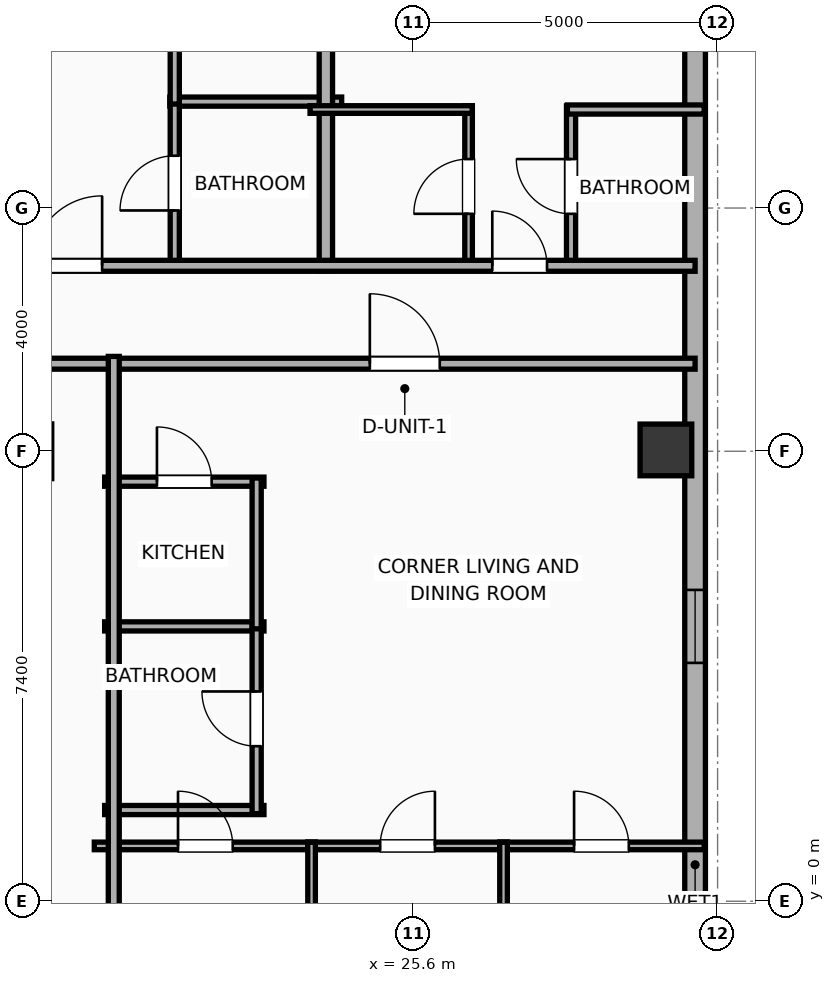
"""IFC4 building model, lengths in metres.
Left out: names, types, materials, properties, quantities, classifications, styles, units other than length and angle.
Written with IfcOpenShell. Run it as: python <this file> out.ifc"""

import sys

from ifc_helpers import new_model, si_unit, direction, frame, frame_2d, origin, origin_2d, place, context, subcontext, project, spatial, rectangle, hollow_rectangle, extrude, element, fill, save


model = new_model("IFC4")
c1 = context("Model", 3, precision=1e-05, world=origin(), true_north=direction((0.0, 1.0)))
c2 = subcontext(c1, "Body", "Model", "MODEL_VIEW")
j1 = project(units=[si_unit("LENGTHUNIT", "METRE"), si_unit("PLANEANGLEUNIT", "RADIAN")], contexts=[c1])
p1 = place(None, origin())
s1 = spatial("IfcSite", under=j1, at=p1, CompositionType="ELEMENT")
p2 = place(p1, origin())
s2 = spatial("IfcBuilding", under=s1, at=p2, CompositionType="ELEMENT")
p3 = place(p2, frame((0.0, 0.0, 250.9)))
s3 = spatial("IfcBuildingStorey", under=s2, at=p3, CompositionType="ELEMENT", Elevation=250.9)
p4 = place(p3, frame((29.75, 7.422, 0.0), z_axis=(0.0, 0.0, 1.0), x_axis=(1.0, 0.0, 0.0)))
e1 = element("IfcColumn", 1, at=p4, inside=s3, PredefinedType="COLUMN", context=c2, shape_type="SweptSolid", body=[
    extrude(hollow_rectangle(XDim=0.85, YDim=0.85, WallThickness=0.028, at=origin_2d()), origin(), (0.0, 0.0, 1.0), 3.865),
])
p5 = place(p3, frame((30.23, 16.583, 0.0), z_axis=(0.0, 0.0, 1.0), x_axis=(0.0, -1.0, 0.0)))
e2 = element("IfcWall", 2, at=p5, inside=s3, PredefinedType="ELEMENTEDWALL", context=c2, shape_type="SweptSolid", body=[
    extrude(rectangle(XDim=31.967, YDim=0.34, at=frame_2d((15.983, 0.0))), origin(), (0.0, 0.0, 1.0), 2.39),
])
p6 = place(p5, frame((30.106, 0.0, 0.55)))
e3 = element("IfcOpeningElement", 3, at=p6, cuts=e2, PredefinedType="OPENING", context=c2, shape_type="SweptSolid", body=[
    extrude(rectangle(XDim=1.2, YDim=1.15, at=frame_2d((0.6, 0.575))), frame((0.0, 0.18, 0.0), z_axis=(0.0, -1.0, 0.0), x_axis=(1.0, 0.0, 0.0)), (0.0, 0.0, 1.0), 0.36),
])
p7 = place(p5, frame((11.463, 0.0, 0.55)))
e4 = element("IfcOpeningElement", 4, at=p7, cuts=e2, PredefinedType="OPENING", context=c2, shape_type="SweptSolid", body=[
    extrude(rectangle(XDim=1.2, YDim=1.15, at=frame_2d((0.6, 0.575))), frame((0.0, 0.18, 0.0), z_axis=(0.0, -1.0, 0.0), x_axis=(1.0, 0.0, 0.0)), (0.0, 0.0, 1.0), 0.36),
])
p8 = place(p5, frame((20.363, 0.0, 0.55)))
e5 = element("IfcOpeningElement", 5, at=p8, cuts=e2, PredefinedType="OPENING", context=c2, shape_type="SweptSolid", body=[
    extrude(rectangle(XDim=1.2, YDim=1.15, at=frame_2d((0.6, 0.575))), frame((0.0, 0.18, 0.0), z_axis=(0.0, -1.0, 0.0), x_axis=(1.0, 0.0, 0.0)), (0.0, 0.0, 1.0), 0.36),
])
p9 = place(p3, frame((9.88, 8.84, 0.0), z_axis=(0.0, 0.0, 1.0), x_axis=(1.0, 0.0, 0.0)))
e6 = element("IfcWall", 6, at=p9, inside=s3, PredefinedType="PARTITIONING", context=c2, shape_type="SweptSolid", body=[
    extrude(rectangle(XDim=20.35, YDim=0.18, at=frame_2d((10.175, 0.0))), origin(), (0.0, 0.0, 1.0), 3.5),
])
p10 = place(p9, frame((15.001, 0.0, 0.0)))
e7 = element("IfcOpeningElement", 7, at=p10, cuts=e6, PredefinedType="OPENING", context=c2, shape_type="SweptSolid", body=[
    extrude(rectangle(XDim=1.15, YDim=2.05, at=frame_2d((0.575, 1.025))), frame((0.0, 0.1, 0.0), z_axis=(0.0, -1.0, 0.0), x_axis=(1.0, 0.0, 0.0)), (0.0, 0.0, 1.0), 0.2),
])
p11 = place(p3, frame((21.593, 13.15, 0.0), z_axis=(0.0, 0.0, 1.0), x_axis=(1.0, 0.0, 0.0)))
e8 = element("IfcWall", 8, at=p11, inside=s3, PredefinedType="PLUMBINGWALL", context=c2, shape_type="SweptSolid", body=[
    extrude(rectangle(XDim=2.825, YDim=0.15, at=frame_2d((1.413, 0.0))), origin(), (0.0, 0.0, 1.0), 3.5),
])
p12 = place(p3, frame((21.673, 10.43, 0.0), z_axis=(0.0, 0.0, 1.0), x_axis=(0.0, 1.0, 0.0)))
e9 = element("IfcWall", 9, at=p12, inside=s3, PredefinedType="PLUMBINGWALL", context=c2, shape_type="SweptSolid", body=[
    extrude(rectangle(XDim=2.76, YDim=0.15, at=frame_2d((1.38, 0.0))), origin(), (0.0, 0.0, 1.0), 2.39),
])
p13 = place(p12, frame((0.93, 0.0, 0.0)))
e10 = element("IfcOpeningElement", 10, at=p13, cuts=e9, PredefinedType="OPENING", context=c2, shape_type="SweptSolid", body=[
    extrude(rectangle(XDim=0.9, YDim=2.05, at=frame_2d((0.45, 1.025))), frame((0.0, 0.085, 0.0), z_axis=(0.0, -1.0, 0.0), x_axis=(1.0, 0.0, 0.0)), (0.0, 0.0, 1.0), 0.17),
])
p14 = place(p3, frame((21.673, 13.11, 0.0), z_axis=(0.0, 0.0, 1.0), x_axis=(0.0, 1.0, 0.0)))
e11 = element("IfcWall", 11, at=p14, inside=s3, PredefinedType="PLUMBINGWALL", context=c2, shape_type="SweptSolid", body=[
    extrude(rectangle(XDim=6.967, YDim=0.15, at=frame_2d((3.483, 0.0))), origin(), (0.0, 0.0, 1.0), 2.39),
])
p15 = place(p14, frame((3.033, 0.0, 0.0)))
e12 = element("IfcOpeningElement", 12, at=p15, cuts=e11, PredefinedType="OPENING", context=c2, shape_type="SweptSolid", body=[
    extrude(rectangle(XDim=0.9, YDim=2.05, at=frame_2d((0.45, 1.025))), frame((0.0, 0.085, 0.0), z_axis=(0.0, -1.0, 0.0), x_axis=(1.0, 0.0, 0.0)), (0.0, 0.0, 1.0), 0.17),
])
p16 = place(p3, frame((24.158, 10.37, 0.0), z_axis=(0.0, 0.0, 1.0), x_axis=(0.0, 1.0, 0.0)))
e13 = element("IfcWall", 13, at=p16, inside=s3, PredefinedType="PARTITIONING", context=c2, shape_type="SweptSolid", body=[
    extrude(rectangle(XDim=9.66, YDim=0.22, at=frame_2d((4.83, 0.0))), origin(), (0.0, 0.0, 1.0), 2.39),
])
p17 = place(p3, frame((26.505, 10.43, 0.0), z_axis=(0.0, 0.0, 1.0), x_axis=(0.0, 1.0, 0.0)))
e14 = element("IfcWall", 14, at=p17, inside=s3, PredefinedType="PARTITIONING", context=c2, shape_type="SweptSolid", body=[
    extrude(rectangle(XDim=2.65, YDim=0.125, at=frame_2d((1.325, 0.0))), origin(), (0.0, 0.0, 1.0), 3.5),
])
p18 = place(p17, frame((0.875, 0.0, 0.0)))
e15 = element("IfcOpeningElement", 15, at=p18, cuts=e14, PredefinedType="OPENING", context=c2, shape_type="SweptSolid", body=[
    extrude(rectangle(XDim=0.9, YDim=2.05, at=frame_2d((0.45, 1.025))), frame((0.0, 0.073, 0.0), z_axis=(0.0, -1.0, 0.0), x_axis=(1.0, 0.0, 0.0)), (0.0, 0.0, 1.0), 0.145),
])
p19 = place(p3, frame((28.19, 10.43, 0.0), z_axis=(0.0, 0.0, 1.0), x_axis=(0.0, 1.0, 0.0)))
e16 = element("IfcWall", 16, at=p19, inside=s3, PredefinedType="PLUMBINGWALL", context=c2, shape_type="SweptSolid", body=[
    extrude(rectangle(XDim=2.65, YDim=0.15, at=frame_2d((1.325, 0.0))), origin(), (0.0, 0.0, 1.0), 3.5),
])
p20 = place(p19, frame((0.875, 0.0, 0.0)))
e17 = element("IfcOpeningElement", 17, at=p20, cuts=e16, PredefinedType="OPENING", context=c2, shape_type="SweptSolid", body=[
    extrude(rectangle(XDim=0.9, YDim=2.05, at=frame_2d((0.45, 1.025))), frame((0.0, 0.085, 0.0), z_axis=(0.0, -1.0, 0.0), x_axis=(1.0, 0.0, 0.0)), (0.0, 0.0, 1.0), 0.17),
])
p21 = place(p3, frame((23.898, 13.02, 0.0), z_axis=(0.0, 0.0, 1.0), x_axis=(1.0, 0.0, 0.0)))
e18 = element("IfcWall", 18, at=p21, inside=s3, PredefinedType="PARTITIONING", context=c2, shape_type="SweptSolid", body=[
    extrude(rectangle(XDim=2.667, YDim=0.125, at=frame_2d((1.333, 0.0))), origin(), (0.0, 0.0, 1.0), 3.5),
])
p22 = place(p3, frame((28.13, 13.02, 0.0), z_axis=(0.0, 0.0, 1.0), x_axis=(1.0, 0.0, 0.0)))
e19 = element("IfcWall", 19, at=p22, inside=s3, PredefinedType="PLUMBINGWALL", context=c2, shape_type="SweptSolid", body=[
    extrude(rectangle(XDim=2.25, YDim=0.15, at=frame_2d((1.125, 0.0))), origin(), (0.0, 0.0, 1.0), 3.5),
])
p23 = place(p3, frame((-26.23, 10.45, 0.0), z_axis=(0.0, 0.0, 1.0), x_axis=(1.0, 0.0, 0.0)))
e20 = element("IfcWall", 20, at=p23, inside=s3, PredefinedType="PARTITIONING", context=c2, shape_type="SweptSolid", body=[
    extrude(rectangle(XDim=56.46, YDim=0.18, at=frame_2d((28.23, 0.0))), origin(), (0.0, 0.0, 1.0), 3.5),
])
p24 = place(p23, frame((3.072, 0.0, 0.0)))
e21 = element("IfcOpeningElement", 21, at=p24, cuts=e20, PredefinedType="OPENING", context=c2, shape_type="SweptSolid", body=[
    extrude(rectangle(XDim=1.15, YDim=2.05, at=frame_2d((0.575, 1.025))), frame((0.0, 0.1, 0.0), z_axis=(0.0, -1.0, 0.0), x_axis=(1.0, 0.0, 0.0)), (0.0, 0.0, 1.0), 0.2),
])
p25 = place(p23, frame((12.146, 0.0, 0.0)))
e22 = element("IfcOpeningElement", 22, at=p25, cuts=e20, PredefinedType="OPENING", context=c2, shape_type="SweptSolid", body=[
    extrude(rectangle(XDim=1.15, YDim=2.05, at=frame_2d((0.575, 1.025))), frame((0.0, 0.1, 0.0), z_axis=(0.0, -1.0, 0.0), x_axis=(1.0, 0.0, 0.0)), (0.0, 0.0, 1.0), 0.2),
])
p26 = place(p23, frame((22.302, 0.0, 0.0)))
e23 = element("IfcOpeningElement", 23, at=p26, cuts=e20, PredefinedType="OPENING", context=c2, shape_type="SweptSolid", body=[
    extrude(rectangle(XDim=1.15, YDim=2.05, at=frame_2d((0.575, 1.025))), frame((0.0, 0.1, 0.0), z_axis=(0.0, -1.0, 0.0), x_axis=(1.0, 0.0, 0.0)), (0.0, 0.0, 1.0), 0.2),
])
p27 = place(p23, frame((32.601, 0.0, 0.0)))
e24 = element("IfcOpeningElement", 24, at=p27, cuts=e20, PredefinedType="OPENING", context=c2, shape_type="SweptSolid", body=[
    extrude(rectangle(XDim=1.15, YDim=2.05, at=frame_2d((0.575, 1.025))), frame((0.0, 0.1, 0.0), z_axis=(0.0, -1.0, 0.0), x_axis=(1.0, 0.0, 0.0)), (0.0, 0.0, 1.0), 0.2),
])
p28 = place(p23, frame((40.941, 0.0, 0.0)))
e25 = element("IfcOpeningElement", 25, at=p28, cuts=e20, PredefinedType="OPENING", context=c2, shape_type="SweptSolid", body=[
    extrude(rectangle(XDim=0.9, YDim=2.05, at=frame_2d((0.45, 1.025))), frame((0.0, 0.1, 0.0), z_axis=(0.0, -1.0, 0.0), x_axis=(1.0, 0.0, 0.0)), (0.0, 0.0, 1.0), 0.2),
])
p29 = place(p23, frame((45.559, 0.0, 0.0)))
e26 = element("IfcOpeningElement", 26, at=p29, cuts=e20, PredefinedType="OPENING", context=c2, shape_type="SweptSolid", body=[
    extrude(rectangle(XDim=1.15, YDim=2.05, at=frame_2d((0.575, 1.025))), frame((0.0, 0.1, 0.0), z_axis=(0.0, -1.0, 0.0), x_axis=(1.0, 0.0, 0.0)), (0.0, 0.0, 1.0), 0.2),
])
p30 = place(p23, frame((53.125, 0.0, 0.0)))
e27 = element("IfcOpeningElement", 27, at=p30, cuts=e20, PredefinedType="OPENING", context=c2, shape_type="SweptSolid", body=[
    extrude(rectangle(XDim=0.9, YDim=2.05, at=frame_2d((0.45, 1.025))), frame((0.0, 0.1, 0.0), z_axis=(0.0, -1.0, 0.0), x_axis=(1.0, 0.0, 0.0)), (0.0, 0.0, 1.0), 0.2),
])
p31 = place(p3, frame((20.52, 6.9, 0.0), z_axis=(0.0, 0.0, 1.0), x_axis=(1.0, 0.0, 0.0)))
e28 = element("IfcWall", 28, at=p31, inside=s3, PredefinedType="PLUMBINGWALL", context=c2, shape_type="SweptSolid", body=[
    extrude(rectangle(XDim=2.62, YDim=0.15, at=frame_2d((1.31, 0.0))), origin(), (0.0, 0.0, 1.0), 2.39),
])
p32 = place(p31, frame((0.86, 0.0, 0.0)))
e29 = element("IfcOpeningElement", 29, at=p32, cuts=e28, PredefinedType="OPENING", context=c2, shape_type="SweptSolid", body=[
    extrude(rectangle(XDim=0.9, YDim=2.05, at=frame_2d((0.45, 1.025))), frame((0.0, 0.085, 0.0), z_axis=(0.0, -1.0, 0.0), x_axis=(1.0, 0.0, 0.0)), (0.0, 0.0, 1.0), 0.17),
])
for number, where, z_axis, x_axis in (
    (30, (20.52, 4.52, 0.0), (0.0, 0.0, 1.0), (1.0, 0.0, 0.0)),
    (31, (20.52, 1.5, 0.0), (0.0, 0.0, 1.0), (1.0, 0.0, 0.0)),
):
    element("IfcWall", number, at=place(p3, frame(where, z_axis=z_axis, x_axis=x_axis)), inside=s3, PredefinedType="PLUMBINGWALL", context=c2, shape_type="SweptSolid", body=[
        extrude(rectangle(XDim=2.62, YDim=0.15, at=frame_2d((1.31, 0.0))), origin(), (0.0, 0.0, 1.0), 3.5),
    ])
p33 = place(p3, frame((23.02, 1.44, 0.0), z_axis=(0.0, 0.0, 1.0), x_axis=(0.0, 1.0, 0.0)))
e32 = element("IfcWall", 32, at=p33, inside=s3, PredefinedType="PLUMBINGWALL", context=c2, shape_type="SweptSolid", body=[
    extrude(rectangle(XDim=3.12, YDim=0.15, at=frame_2d((1.56, 0.0))), origin(), (0.0, 0.0, 1.0), 3.5),
])
p34 = place(p33, frame((1.11, 0.0, 0.0)))
e33 = element("IfcOpeningElement", 33, at=p34, cuts=e32, PredefinedType="OPENING", context=c2, shape_type="SweptSolid", body=[
    extrude(rectangle(XDim=0.9, YDim=2.05, at=frame_2d((0.45, 1.025))), frame((0.0, 0.085, 0.0), z_axis=(0.0, -1.0, 0.0), x_axis=(1.0, 0.0, 0.0)), (0.0, 0.0, 1.0), 0.17),
])
p35 = place(p3, frame((23.02, 4.48, 0.0), z_axis=(0.0, 0.0, 1.0), x_axis=(0.0, 1.0, 0.0)))
e34 = element("IfcWall", 34, at=p35, inside=s3, PredefinedType="PLUMBINGWALL", context=c2, shape_type="SweptSolid", body=[
    extrude(rectangle(XDim=2.48, YDim=0.15, at=frame_2d((1.24, 0.0))), origin(), (0.0, 0.0, 1.0), 3.5),
])
p36 = place(p3, frame((20.35, 0.91, 0.0), z_axis=(0.0, 0.0, 1.0), x_axis=(1.0, 0.0, 0.0)))
e35 = element("IfcWall", 35, at=p36, inside=s3, PredefinedType="PARTITIONING", context=c2, shape_type="SweptSolid", body=[
    extrude(rectangle(XDim=3.635, YDim=0.125, at=frame_2d((1.818, 0.0))), origin(), (0.0, 0.0, 1.0), 3.5),
])
p37 = place(p36, frame((1.376, 0.0, 0.0)))
e36 = element("IfcOpeningElement", 36, at=p37, cuts=e35, PredefinedType="OPENING", context=c2, shape_type="SweptSolid", body=[
    extrude(rectangle(XDim=0.9, YDim=2.05, at=frame_2d((0.45, 1.025))), frame((0.0, 0.073, 0.0), z_axis=(0.0, -1.0, 0.0), x_axis=(1.0, 0.0, 0.0)), (0.0, 0.0, 1.0), 0.145),
])
p38 = place(p3, frame((23.861, 0.91, 0.0), z_axis=(0.0, 0.0, 1.0), x_axis=(1.0, 0.0, 0.0)))
e37 = element("IfcWall", 37, at=p38, inside=s3, PredefinedType="PARTITIONING", context=c2, shape_type="SweptSolid", body=[
    extrude(rectangle(XDim=3.282, YDim=0.125, at=frame_2d((1.641, 0.0))), origin(), (0.0, 0.0, 1.0), 3.5),
])
p39 = place(p38, frame((1.191, 0.0, 0.0)))
e38 = element("IfcOpeningElement", 38, at=p39, cuts=e37, PredefinedType="OPENING", context=c2, shape_type="SweptSolid", body=[
    extrude(rectangle(XDim=0.9, YDim=2.05, at=frame_2d((0.45, 1.025))), frame((0.0, 0.073, 0.0), z_axis=(0.0, -1.0, 0.0), x_axis=(1.0, 0.0, 0.0)), (0.0, 0.0, 1.0), 0.145),
])
p40 = place(p3, frame((27.018, 0.91, 0.0), z_axis=(0.0, 0.0, 1.0), x_axis=(1.0, 0.0, 0.0)))
e39 = element("IfcWall", 39, at=p40, inside=s3, PredefinedType="PARTITIONING", context=c2, shape_type="SweptSolid", body=[
    extrude(rectangle(XDim=3.362, YDim=0.125, at=frame_2d((1.681, 0.0))), origin(), (0.0, 0.0, 1.0), 3.5),
])
p41 = place(p40, frame((1.222, 0.0, 0.0)))
e40 = element("IfcOpeningElement", 40, at=p41, cuts=e39, PredefinedType="OPENING", context=c2, shape_type="SweptSolid", body=[
    extrude(rectangle(XDim=0.9, YDim=2.05, at=frame_2d((0.45, 1.025))), frame((0.0, 0.073, 0.0), z_axis=(0.0, -1.0, 0.0), x_axis=(1.0, 0.0, 0.0)), (0.0, 0.0, 1.0), 0.145),
])
p42 = place(p3, frame((27.08, -9.16, 0.0), z_axis=(0.0, 0.0, 1.0), x_axis=(0.0, 1.0, 0.0)))
e41 = element("IfcWall", 41, at=p42, inside=s3, PredefinedType="PARTITIONING", context=c2, shape_type="SweptSolid", body=[
    extrude(rectangle(XDim=10.13, YDim=0.125, at=frame_2d((5.065, 0.0))), origin(), (0.0, 0.0, 1.0), 3.5),
])
p43 = place(p3, frame((23.923, -9.16, 0.0), z_axis=(0.0, 0.0, 1.0), x_axis=(0.0, 1.0, 0.0)))
e42 = element("IfcWall", 42, at=p43, inside=s3, PredefinedType="PARTITIONING", context=c2, shape_type="SweptSolid", body=[
    extrude(rectangle(XDim=10.13, YDim=0.125, at=frame_2d((5.065, 0.0))), origin(), (0.0, 0.0, 1.0), 2.39),
])
p44 = place(p3, frame((20.67, -8.96, 0.0), z_axis=(0.0, 0.0, 1.0), x_axis=(0.0, 1.0, 0.0)))
e43 = element("IfcWall", 43, at=p44, inside=s3, PredefinedType="PARTITIONING", context=c2, shape_type="SweptSolid", body=[
    extrude(rectangle(XDim=17.92, YDim=0.18, at=frame_2d((8.96, 0.0))), origin(), (0.0, 0.0, 1.0), 3.5),
])
p45 = place(p7, origin())
e44 = element("IfcWindow", 44, at=p45, inside=s3, PartitioningType="SINGLE_PANEL", PredefinedType="WINDOW", context=c2, shape_type="SweptSolid", body=[
    extrude(rectangle(XDim=1.2, YDim=1.15, at=frame_2d((0.6, 0.575))), frame((0.0, 0.03, 0.0), z_axis=(0.0, -1.0, 0.0), x_axis=(1.0, 0.0, 0.0)), (0.0, 0.0, 1.0), 0.06),
])
fill(e4, e44)
p46 = place(p10, origin())
e45 = element("IfcDoor", 45, at=p46, inside=s3, OperationType="SINGLE_SWING_LEFT", PredefinedType="DOOR", context=c2, shape_type="SweptSolid", body=[
    extrude(rectangle(XDim=1.15, YDim=2.05, at=frame_2d((0.575, 1.025))), frame((0.0, 0.025, 0.0), z_axis=(0.0, -1.0, 0.0), x_axis=(1.0, 0.0, 0.0)), (0.0, 0.0, 1.0), 0.05),
])
fill(e7, e45)
p47 = place(p13, origin())
e46 = element("IfcDoor", 46, at=p47, inside=s3, OperationType="SINGLE_SWING_LEFT", PredefinedType="DOOR", context=c2, shape_type="SweptSolid", body=[
    extrude(rectangle(XDim=0.9, YDim=2.05, at=frame_2d((0.45, 1.025))), frame((0.0, 0.025, 0.0), z_axis=(0.0, -1.0, 0.0), x_axis=(1.0, 0.0, 0.0)), (0.0, 0.0, 1.0), 0.05),
])
fill(e10, e46)
p48 = place(p18, origin())
e47 = element("IfcDoor", 47, at=p48, inside=s3, OperationType="SINGLE_SWING_LEFT", PredefinedType="DOOR", context=c2, shape_type="SweptSolid", body=[
    extrude(rectangle(XDim=0.9, YDim=2.05, at=frame_2d((0.45, 1.025))), frame((0.0, 0.025, 0.0), z_axis=(0.0, -1.0, 0.0), x_axis=(1.0, 0.0, 0.0)), (0.0, 0.0, 1.0), 0.05),
])
fill(e15, e47)
p49 = place(p20, origin())
e48 = element("IfcDoor", 48, at=p49, inside=s3, OperationType="SINGLE_SWING_RIGHT", PredefinedType="DOOR", context=c2, shape_type="SweptSolid", body=[
    extrude(rectangle(XDim=0.9, YDim=2.05, at=frame_2d((0.45, 1.025))), frame((0.0, 0.025, 0.0), z_axis=(0.0, -1.0, 0.0), x_axis=(1.0, 0.0, 0.0)), (0.0, 0.0, 1.0), 0.05),
])
fill(e17, e48)
p50 = place(p29, origin())
e49 = element("IfcDoor", 49, at=p50, inside=s3, OperationType="SINGLE_SWING_RIGHT", PredefinedType="DOOR", context=c2, shape_type="SweptSolid", body=[
    extrude(rectangle(XDim=1.15, YDim=2.05, at=frame_2d((0.575, 1.025))), frame((0.0, 0.025, 0.0), z_axis=(0.0, -1.0, 0.0), x_axis=(1.0, 0.0, 0.0)), (0.0, 0.0, 1.0), 0.05),
])
fill(e26, e49)
p51 = place(p30, origin())
e50 = element("IfcDoor", 50, at=p51, inside=s3, OperationType="SINGLE_SWING_LEFT", PredefinedType="DOOR", context=c2, shape_type="SweptSolid", body=[
    extrude(rectangle(XDim=0.9, YDim=2.05, at=frame_2d((0.45, 1.025))), frame((0.0, 0.025, 0.0), z_axis=(0.0, -1.0, 0.0), x_axis=(1.0, 0.0, 0.0)), (0.0, 0.0, 1.0), 0.05),
])
fill(e27, e50)
p52 = place(p32, origin())
e51 = element("IfcDoor", 51, at=p52, inside=s3, OperationType="SINGLE_SWING_LEFT", PredefinedType="DOOR", context=c2, shape_type="SweptSolid", body=[
    extrude(rectangle(XDim=0.9, YDim=2.05, at=frame_2d((0.45, 1.025))), frame((0.0, 0.025, 0.0), z_axis=(0.0, -1.0, 0.0), x_axis=(1.0, 0.0, 0.0)), (0.0, 0.0, 1.0), 0.05),
])
fill(e29, e51)
p53 = place(p34, origin())
e52 = element("IfcDoor", 52, at=p53, inside=s3, OperationType="SINGLE_SWING_RIGHT", PredefinedType="DOOR", context=c2, shape_type="SweptSolid", body=[
    extrude(rectangle(XDim=0.9, YDim=2.05, at=frame_2d((0.45, 1.025))), frame((0.0, 0.025, 0.0), z_axis=(0.0, -1.0, 0.0), x_axis=(1.0, 0.0, 0.0)), (0.0, 0.0, 1.0), 0.05),
])
fill(e33, e52)
p54 = place(p37, origin())
e53 = element("IfcDoor", 53, at=p54, inside=s3, OperationType="SINGLE_SWING_LEFT", PredefinedType="DOOR", context=c2, shape_type="SweptSolid", body=[
    extrude(rectangle(XDim=0.9, YDim=2.05, at=frame_2d((0.45, 1.025))), frame((0.0, 0.025, 0.0), z_axis=(0.0, -1.0, 0.0), x_axis=(1.0, 0.0, 0.0)), (0.0, 0.0, 1.0), 0.05),
])
fill(e36, e53)
p55 = place(p39, origin())
e54 = element("IfcDoor", 54, at=p55, inside=s3, OperationType="SINGLE_SWING_RIGHT", PredefinedType="DOOR", context=c2, shape_type="SweptSolid", body=[
    extrude(rectangle(XDim=0.9, YDim=2.05, at=frame_2d((0.45, 1.025))), frame((0.0, 0.025, 0.0), z_axis=(0.0, -1.0, 0.0), x_axis=(1.0, 0.0, 0.0)), (0.0, 0.0, 1.0), 0.05),
])
fill(e38, e54)
p56 = place(p41, origin())
e55 = element("IfcDoor", 55, at=p56, inside=s3, OperationType="SINGLE_SWING_LEFT", PredefinedType="DOOR", context=c2, shape_type="SweptSolid", body=[
    extrude(rectangle(XDim=0.9, YDim=2.05, at=frame_2d((0.45, 1.025))), frame((0.0, 0.025, 0.0), z_axis=(0.0, -1.0, 0.0), x_axis=(1.0, 0.0, 0.0)), (0.0, 0.0, 1.0), 0.05),
])
fill(e40, e55)
save(model, sys.argv[1])
